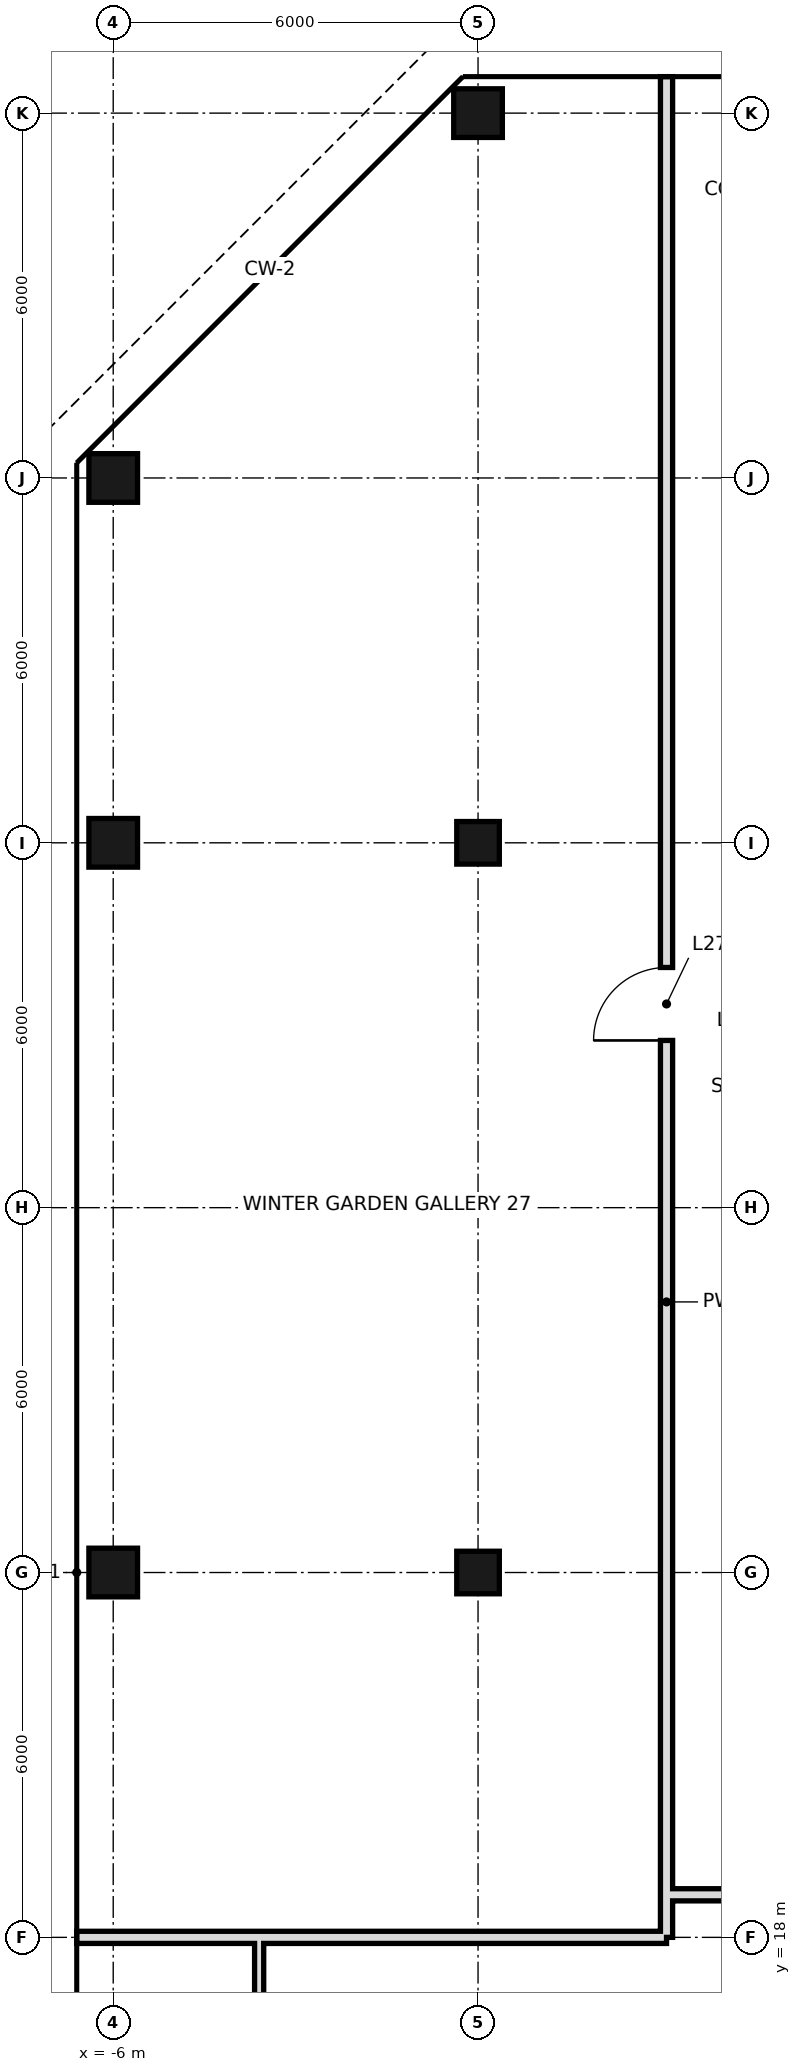
"""IFC4 building model, lengths in metres.
Left out: names, types, materials, properties, quantities, classifications, styles, units other than length and angle.
Written with IfcOpenShell. Run it as: python <this file> out.ifc"""

import sys

from ifc_helpers import new_model, si_unit, direction, frame, frame_2d, origin, origin_2d, place, context, subcontext, project, spatial, rectangle, hollow_rectangle, extrude, element, fill, save


model = new_model("IFC4")
c1 = context("Model", 3, precision=1e-05, world=origin(), true_north=direction((0.0, 1.0)))
c2 = subcontext(c1, "Body", "Model", "MODEL_VIEW")
j1 = project(units=[si_unit("LENGTHUNIT", "METRE"), si_unit("PLANEANGLEUNIT", "RADIAN")], contexts=[c1])
p1 = place(None, origin())
s1 = spatial("IfcSite", under=j1, at=p1, CompositionType="ELEMENT")
p2 = place(p1, origin())
s2 = spatial("IfcBuilding", under=s1, at=p2, CompositionType="ELEMENT")
p3 = place(p2, frame((0.0, 0.0, 123.2)))
s3 = spatial("IfcBuildingStorey", under=s2, at=p3, CompositionType="ELEMENT", Elevation=123.2)
for number, where, z_axis, x_axis in (
    (1, (-6.0, 24.0, 0.0), (0.0, 0.0, 1.0), (1.0, 0.0, 0.0)),
    (2, (-6.0, 36.0, 0.0), (0.0, 0.0, 1.0), (1.0, 0.0, 0.0)),
    (3, (-6.0, 42.0, 0.0), (0.0, 0.0, 1.0), (1.0, 0.0, 0.0)),
):
    element("IfcColumn", number, at=place(p3, frame(where, z_axis=z_axis, x_axis=x_axis)), inside=s3, PredefinedType="COLUMN", context=c2, shape_type="SweptSolid", body=[
        extrude(hollow_rectangle(XDim=0.8, YDim=0.8, WallThickness=0.04, at=origin_2d()), origin(), (0.0, 0.0, 1.0), 3.6),
    ])
for number, where, z_axis, x_axis in (
    (4, (0.0, 24.0, 0.0), (0.0, 0.0, 1.0), (1.0, 0.0, 0.0)),
    (5, (0.0, 36.0, 0.0), (0.0, 0.0, 1.0), (1.0, 0.0, 0.0)),
):
    element("IfcColumn", number, at=place(p3, frame(where, z_axis=z_axis, x_axis=x_axis)), inside=s3, PredefinedType="COLUMN", context=c2, shape_type="SweptSolid", body=[
        extrude(hollow_rectangle(XDim=0.7, YDim=0.7, WallThickness=0.036, at=origin_2d()), origin(), (0.0, 0.0, 1.0), 3.6),
    ])
p4 = place(p3, frame((0.0, 48.0, 0.0), z_axis=(0.0, 0.0, 1.0), x_axis=(1.0, 0.0, 0.0)))
e6 = element("IfcColumn", 6, at=p4, inside=s3, PredefinedType="COLUMN", context=c2, shape_type="SweptSolid", body=[
    extrude(hollow_rectangle(XDim=0.8, YDim=0.8, WallThickness=0.04, at=origin_2d()), origin(), (0.0, 0.0, 1.0), 3.6),
])
p5 = place(p3, frame((-3.6, 10.8, 0.0), z_axis=(0.0, 0.0, 1.0), x_axis=(0.0, 1.0, 0.0)))
e7 = element("IfcWall", 7, at=p5, inside=s3, PredefinedType="PARTITIONING", context=c2, shape_type="SweptSolid", body=[
    extrude(rectangle(XDim=7.2, YDim=0.15, at=frame_2d((3.6, 0.0))), origin(), (0.0, 0.0, 1.0), 3.42),
])
p6 = place(p3, frame((3.1, 18.0, 0.0), z_axis=(0.0, 0.0, 1.0), x_axis=(0.0, 1.0, 0.0)))
e8 = element("IfcWall", 8, at=p6, inside=s3, PredefinedType="SOLIDWALL", context=c2, shape_type="SweptSolid", body=[
    extrude(rectangle(XDim=30.6, YDim=0.2, at=frame_2d((15.3, 0.0))), origin(), (0.0, 0.0, 1.0), 2.72),
])
p7 = place(p6, frame((14.75, 0.0, 0.0)))
e9 = element("IfcOpeningElement", 9, at=p7, cuts=e8, PredefinedType="OPENING", context=c2, shape_type="SweptSolid", body=[
    extrude(rectangle(XDim=1.2, YDim=2.4, at=frame_2d((0.6, 1.2))), frame((0.0, 0.11, 0.0), z_axis=(0.0, -1.0, 0.0), x_axis=(1.0, 0.0, 0.0)), (0.0, 0.0, 1.0), 0.22),
])
p8 = place(p3, frame((-6.6, 18.0, 0.0), z_axis=(0.0, 0.0, 1.0), x_axis=(1.0, 0.0, 0.0)))
e10 = element("IfcWall", 10, at=p8, inside=s3, PredefinedType="SOLIDWALL", context=c2, shape_type="SweptSolid", body=[
    extrude(rectangle(XDim=9.7, YDim=0.2, at=frame_2d((4.85, 0.0))), origin(), (0.0, 0.0, 1.0), 2.72),
])
p9 = place(p3, frame((3.1, 18.7, 0.0), z_axis=(0.0, 0.0, 1.0), x_axis=(1.0, 0.0, 0.0)))
e11 = element("IfcWall", 11, at=p9, inside=s3, PredefinedType="SOLIDWALL", context=c2, shape_type="SweptSolid", body=[
    extrude(rectangle(XDim=15.5, YDim=0.2, at=frame_2d((7.75, 0.0))), origin(), (0.0, 0.0, 1.0), 2.72),
])
p10 = place(p9, frame((11.04, 0.0, 0.0)))
e12 = element("IfcOpeningElement", 12, at=p10, cuts=e11, PredefinedType="OPENING", context=c2, shape_type="SweptSolid", body=[
    extrude(rectangle(XDim=1.2, YDim=2.4, at=frame_2d((0.6, 1.2))), frame((0.0, 0.11, 0.0), z_axis=(0.0, -1.0, 0.0), x_axis=(1.0, 0.0, 0.0)), (0.0, 0.0, 1.0), 0.22),
])
p11 = place(p7, origin())
e13 = element("IfcDoor", 13, at=p11, inside=s3, OperationType="SINGLE_SWING_LEFT", PredefinedType="DOOR", context=c2, shape_type="SweptSolid", body=[
    extrude(rectangle(XDim=1.2, YDim=2.4, at=frame_2d((0.6, 1.2))), frame((0.0, 0.025, 0.0), z_axis=(0.0, -1.0, 0.0), x_axis=(1.0, 0.0, 0.0)), (0.0, 0.0, 1.0), 0.05),
])
fill(e9, e13)
save(model, sys.argv[1])
